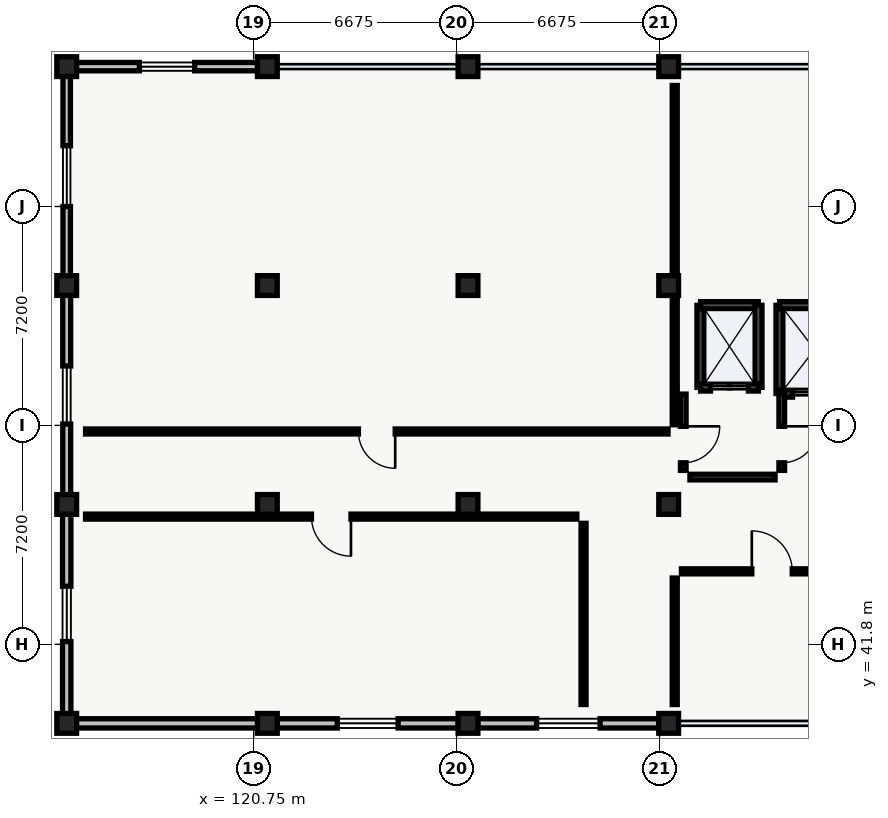
"""IFC4 building model, lengths in metres.
Left out: names, types, materials, properties, quantities, classifications, styles, units other than length and angle.
Written with IfcOpenShell. Run it as: python <this file> out.ifc"""

import sys

from ifc_helpers import new_model, si_unit, direction, frame, frame_2d, origin, origin_2d, place, context, subcontext, project, spatial, rectangle, extrude, element, fill, save


model = new_model("IFC4")
c1 = context("Model", 3, precision=1e-05, world=origin(), true_north=direction((0.0, 1.0)))
c2 = subcontext(c1, "Body", "Model", "MODEL_VIEW")
j1 = project(units=[si_unit("LENGTHUNIT", "METRE"), si_unit("PLANEANGLEUNIT", "RADIAN")], contexts=[c1])
p1 = place(None, origin())
s1 = spatial("IfcSite", under=j1, at=p1, CompositionType="ELEMENT")
p2 = place(p1, origin())
s2 = spatial("IfcBuilding", under=s1, at=p2, CompositionType="ELEMENT")
p3 = place(p2, frame((0.0, 0.0, 18.6)))
s3 = spatial("IfcBuildingStorey", under=s2, at=p3, CompositionType="ELEMENT", Elevation=18.6)
for number, where, z_axis, x_axis in (
    (1, (114.6, 39.2, 0.0), (0.0, 0.0, 1.0), (1.0, 0.0, 0.0)),
    (2, (114.6, 46.4, 0.0), (0.0, 0.0, 1.0), (1.0, 0.0, 0.0)),
    (3, (114.6, 53.6, 0.0), (0.0, 0.0, 1.0), (1.0, 0.0, 0.0)),
    (4, (114.6, 60.8, 0.0), (0.0, 0.0, 1.0), (1.0, 0.0, 0.0)),
    (5, (121.2, 39.2, 0.0), (0.0, 0.0, 1.0), (1.0, 0.0, 0.0)),
    (6, (121.2, 46.4, 0.0), (0.0, 0.0, 1.0), (1.0, 0.0, 0.0)),
    (7, (121.2, 53.6, 0.0), (0.0, 0.0, 1.0), (1.0, 0.0, 0.0)),
    (8, (121.2, 60.8, 0.0), (0.0, 0.0, 1.0), (1.0, 0.0, 0.0)),
    (9, (127.8, 39.2, 0.0), (0.0, 0.0, 1.0), (1.0, 0.0, 0.0)),
    (10, (127.8, 46.4, 0.0), (0.0, 0.0, 1.0), (1.0, 0.0, 0.0)),
    (11, (127.8, 53.6, 0.0), (0.0, 0.0, 1.0), (1.0, 0.0, 0.0)),
    (12, (127.8, 60.8, 0.0), (0.0, 0.0, 1.0), (1.0, 0.0, 0.0)),
    (13, (134.4, 39.2, 0.0), (0.0, 0.0, 1.0), (1.0, 0.0, 0.0)),
    (14, (134.4, 46.4, 0.0), (0.0, 0.0, 1.0), (1.0, 0.0, 0.0)),
    (15, (134.4, 53.6, 0.0), (0.0, 0.0, 1.0), (1.0, 0.0, 0.0)),
    (16, (134.4, 60.8, 0.0), (0.0, 0.0, 1.0), (1.0, 0.0, 0.0)),
):
    element("IfcColumn", number, at=place(p3, frame(where, z_axis=z_axis, x_axis=x_axis)), inside=s3, PredefinedType="COLUMN", context=c2, shape_type="SweptSolid", body=[
        extrude(rectangle(XDim=0.65, YDim=0.65, at=origin_2d()), origin(), (0.0, 0.0, 1.0), 4.3),
    ])
p4 = place(p3, frame((114.6, 39.52, 0.0), z_axis=(0.0, 0.0, 1.0), x_axis=(0.0, 1.0, 0.0)))
e17 = element("IfcWall", 17, at=p4, inside=s3, PredefinedType="STANDARD", context=c2, shape_type="SweptSolid", body=[
    extrude(rectangle(XDim=6.56, YDim=0.275, at=frame_2d((3.28, 0.0))), origin(), (0.0, 0.0, 1.0), 3.835),
])
p5 = place(p4, frame((2.37, 0.0, 0.95)))
e18 = element("IfcOpeningElement", 18, at=p5, cuts=e17, PredefinedType="OPENING", context=c2, shape_type="SweptSolid", body=[
    extrude(rectangle(XDim=1.82, YDim=1.38, at=frame_2d((0.91, 0.69))), frame((0.0, 0.137, 0.0), z_axis=(0.0, -1.0, 0.0), x_axis=(1.0, 0.0, 0.0)), (0.0, 0.0, 1.0), 0.275),
])
p6 = place(p3, frame((114.6, 46.72, 0.0), z_axis=(0.0, 0.0, 1.0), x_axis=(0.0, 1.0, 0.0)))
e19 = element("IfcWall", 19, at=p6, inside=s3, PredefinedType="STANDARD", context=c2, shape_type="SweptSolid", body=[
    extrude(rectangle(XDim=6.56, YDim=0.26, at=frame_2d((3.28, 0.0))), origin(), (0.0, 0.0, 1.0), 3.835),
])
p7 = place(p6, frame((2.325, 0.0, 0.95)))
e20 = element("IfcOpeningElement", 20, at=p7, cuts=e19, PredefinedType="OPENING", context=c2, shape_type="SweptSolid", body=[
    extrude(rectangle(XDim=1.91, YDim=1.4, at=frame_2d((0.955, 0.7))), frame((0.0, 0.13, 0.0), z_axis=(0.0, -1.0, 0.0), x_axis=(1.0, 0.0, 0.0)), (0.0, 0.0, 1.0), 0.26),
])
p8 = place(p3, frame((114.6, 53.92, 0.0), z_axis=(0.0, 0.0, 1.0), x_axis=(0.0, 1.0, 0.0)))
e21 = element("IfcWall", 21, at=p8, inside=s3, PredefinedType="STANDARD", context=c2, shape_type="SweptSolid", body=[
    extrude(rectangle(XDim=6.56, YDim=0.245, at=frame_2d((3.28, 0.0))), origin(), (0.0, 0.0, 1.0), 3.835),
])
p9 = place(p8, frame((2.28, 0.0, 0.95)))
e22 = element("IfcOpeningElement", 22, at=p9, cuts=e21, PredefinedType="OPENING", context=c2, shape_type="SweptSolid", body=[
    extrude(rectangle(XDim=2.0, YDim=1.42, at=frame_2d((1.0, 0.71))), frame((0.0, 0.123, 0.0), z_axis=(0.0, -1.0, 0.0), x_axis=(1.0, 0.0, 0.0)), (0.0, 0.0, 1.0), 0.245),
])
p10 = place(p3, frame((114.92, 60.8, 0.0), z_axis=(0.0, 0.0, 1.0), x_axis=(1.0, 0.0, 0.0)))
e23 = element("IfcWall", 23, at=p10, inside=s3, PredefinedType="STANDARD", context=c2, shape_type="SweptSolid", body=[
    extrude(rectangle(XDim=5.96, YDim=0.275, at=frame_2d((2.98, 0.0))), origin(), (0.0, 0.0, 1.0), 3.835),
])
p11 = place(p10, frame((2.07, 0.0, 0.95)))
e24 = element("IfcOpeningElement", 24, at=p11, cuts=e23, PredefinedType="OPENING", context=c2, shape_type="SweptSolid", body=[
    extrude(rectangle(XDim=1.82, YDim=1.38, at=frame_2d((0.91, 0.69))), frame((0.0, 0.137, 0.0), z_axis=(0.0, -1.0, 0.0), x_axis=(1.0, 0.0, 0.0)), (0.0, 0.0, 1.0), 0.275),
])
p12 = place(p3, frame((134.08, 39.2, 0.0), z_axis=(0.0, 0.0, 1.0), x_axis=(-1.0, 0.0, 0.0)))
e25 = element("IfcWall", 25, at=p12, inside=s3, PredefinedType="STANDARD", context=c2, shape_type="SweptSolid", body=[
    extrude(rectangle(XDim=5.96, YDim=0.305, at=frame_2d((2.98, 0.0))), origin(), (0.0, 0.0, 1.0), 3.835),
])
p13 = place(p12, frame((1.935, 0.0, 0.95)))
e26 = element("IfcOpeningElement", 26, at=p13, cuts=e25, PredefinedType="OPENING", context=c2, shape_type="SweptSolid", body=[
    extrude(rectangle(XDim=2.09, YDim=1.44, at=frame_2d((1.045, 0.72))), frame((0.0, 0.152, 0.0), z_axis=(0.0, -1.0, 0.0), x_axis=(1.0, 0.0, 0.0)), (0.0, 0.0, 1.0), 0.305),
])
p14 = place(p3, frame((127.48, 39.2, 0.0), z_axis=(0.0, 0.0, 1.0), x_axis=(-1.0, 0.0, 0.0)))
e27 = element("IfcWall", 27, at=p14, inside=s3, PredefinedType="STANDARD", context=c2, shape_type="SweptSolid", body=[
    extrude(rectangle(XDim=5.96, YDim=0.305, at=frame_2d((2.98, 0.0))), origin(), (0.0, 0.0, 1.0), 3.835),
])
p15 = place(p14, frame((1.98, 0.0, 0.95)))
e28 = element("IfcOpeningElement", 28, at=p15, cuts=e27, PredefinedType="OPENING", context=c2, shape_type="SweptSolid", body=[
    extrude(rectangle(XDim=2.0, YDim=1.42, at=frame_2d((1.0, 0.71))), frame((0.0, 0.152, 0.0), z_axis=(0.0, -1.0, 0.0), x_axis=(1.0, 0.0, 0.0)), (0.0, 0.0, 1.0), 0.305),
])
p16 = place(p3, frame((120.88, 39.2, 0.0), z_axis=(0.0, 0.0, 1.0), x_axis=(-1.0, 0.0, 0.0)))
e29 = element("IfcWall", 29, at=p16, inside=s3, PredefinedType="STANDARD", context=c2, shape_type="SweptSolid", body=[
    extrude(rectangle(XDim=5.96, YDim=0.305, at=frame_2d((2.98, 0.0))), origin(), (0.0, 0.0, 1.0), 3.835),
])
p17 = place(p3, frame((135.45, 50.25, 0.0), z_axis=(0.0, 0.0, 1.0), x_axis=(0.0, 1.0, 0.0)))
e30 = element("IfcWall", 30, at=p17, inside=s3, PredefinedType="SHEAR", context=c2, shape_type="SweptSolid", body=[
    extrude(rectangle(XDim=2.7, YDim=0.24, at=frame_2d((1.35, 0.0))), origin(), (0.0, 0.0, 1.0), 4.28),
])
p18 = place(p3, frame((135.45, 52.95, 0.0), z_axis=(0.0, 0.0, 1.0), x_axis=(1.0, 0.0, 0.0)))
e31 = element("IfcWall", 31, at=p18, inside=s3, PredefinedType="SHEAR", context=c2, shape_type="SweptSolid", body=[
    extrude(rectangle(XDim=1.9, YDim=0.24, at=frame_2d((0.95, 0.0))), origin(), (0.0, 0.0, 1.0), 4.28),
])
p19 = place(p3, frame((137.35, 52.95, 0.0), z_axis=(0.0, 0.0, 1.0), x_axis=(0.0, -1.0, 0.0)))
e32 = element("IfcWall", 32, at=p19, inside=s3, PredefinedType="SHEAR", context=c2, shape_type="SweptSolid", body=[
    extrude(rectangle(XDim=2.7, YDim=0.24, at=frame_2d((1.35, 0.0))), origin(), (0.0, 0.0, 1.0), 4.28),
])
p20 = place(p3, frame((137.35, 50.25, 0.0), z_axis=(0.0, 0.0, 1.0), x_axis=(-1.0, 0.0, 0.0)))
e33 = element("IfcWall", 33, at=p20, inside=s3, PredefinedType="SHEAR", context=c2, shape_type="SweptSolid", body=[
    extrude(rectangle(XDim=1.9, YDim=0.24, at=frame_2d((0.95, 0.0))), origin(), (0.0, 0.0, 1.0), 4.28),
])
p21 = place(p20, frame((0.325, 0.0, 0.0)))
e34 = element("IfcOpeningElement", 34, at=p21, cuts=e33, PredefinedType="OPENING", context=c2, shape_type="SweptSolid", body=[
    extrude(rectangle(XDim=1.25, YDim=2.2, at=frame_2d((0.625, 1.1))), frame((0.0, 0.12, 0.0), z_axis=(0.0, -1.0, 0.0), x_axis=(1.0, 0.0, 0.0)), (0.0, 0.0, 1.0), 0.24),
])
p22 = place(p3, frame((138.05, 50.05, 0.0), z_axis=(0.0, 0.0, 1.0), x_axis=(0.0, 1.0, 0.0)))
e35 = element("IfcWall", 35, at=p22, inside=s3, PredefinedType="SHEAR", context=c2, shape_type="SweptSolid", body=[
    extrude(rectangle(XDim=2.9, YDim=0.24, at=frame_2d((1.45, 0.0))), origin(), (0.0, 0.0, 1.0), 4.28),
])
p23 = place(p3, frame((138.05, 52.95, 0.0), z_axis=(0.0, 0.0, 1.0), x_axis=(1.0, 0.0, 0.0)))
e36 = element("IfcWall", 36, at=p23, inside=s3, PredefinedType="SHEAR", context=c2, shape_type="SweptSolid", body=[
    extrude(rectangle(XDim=2.3, YDim=0.24, at=frame_2d((1.15, 0.0))), origin(), (0.0, 0.0, 1.0), 4.28),
])
p24 = place(p3, frame((140.35, 50.05, 0.0), z_axis=(0.0, 0.0, 1.0), x_axis=(-1.0, 0.0, 0.0)))
e37 = element("IfcWall", 37, at=p24, inside=s3, PredefinedType="SHEAR", context=c2, shape_type="SweptSolid", body=[
    extrude(rectangle(XDim=2.3, YDim=0.24, at=frame_2d((1.15, 0.0))), origin(), (0.0, 0.0, 1.0), 4.28),
])
p25 = place(p24, frame((0.425, 0.0, 0.0)))
e38 = element("IfcOpeningElement", 38, at=p25, cuts=e37, PredefinedType="OPENING", context=c2, shape_type="SweptSolid", body=[
    extrude(rectangle(XDim=1.45, YDim=2.3, at=frame_2d((0.725, 1.15))), frame((0.0, 0.12, 0.0), z_axis=(0.0, -1.0, 0.0), x_axis=(1.0, 0.0, 0.0)), (0.0, 0.0, 1.0), 0.24),
])
p26 = place(p3, frame((135.1, 47.3, 0.0), z_axis=(0.0, 0.0, 1.0), x_axis=(1.0, 0.0, 0.0)))
e39 = element("IfcWall", 39, at=p26, inside=s3, PredefinedType="SOLIDWALL", context=c2, shape_type="SweptSolid", body=[
    extrude(rectangle(XDim=2.8, YDim=0.185, at=frame_2d((1.4, 0.0))), origin(), (0.0, 0.0, 1.0), 3.95),
])
p27 = place(p3, frame((138.12, 47.52, 0.0), z_axis=(0.0, 0.0, 1.0), x_axis=(0.0, 1.0, 0.0)))
e40 = element("IfcWall", 40, at=p27, inside=s3, PredefinedType="SOLIDWALL", context=c2, shape_type="SweptSolid", body=[
    extrude(rectangle(XDim=2.51, YDim=0.185, at=frame_2d((1.255, 0.0))), origin(), (0.0, 0.0, 1.0), 3.95),
])
p28 = place(p27, frame((0.25, 0.0, 0.0)))
e41 = element("IfcOpeningElement", 41, at=p28, cuts=e40, PredefinedType="OPENING", context=c2, shape_type="SweptSolid", body=[
    extrude(rectangle(XDim=1.2, YDim=2.15, at=frame_2d((0.6, 1.075))), frame((0.0, 0.093, 0.0), z_axis=(0.0, -1.0, 0.0), x_axis=(1.0, 0.0, 0.0)), (0.0, 0.0, 1.0), 0.185),
])
p29 = place(p3, frame((134.88, 50.03, 0.0), z_axis=(0.0, 0.0, 1.0), x_axis=(0.0, -1.0, 0.0)))
e42 = element("IfcWall", 42, at=p29, inside=s3, PredefinedType="SOLIDWALL", context=c2, shape_type="SweptSolid", body=[
    extrude(rectangle(XDim=2.51, YDim=0.185, at=frame_2d((1.255, 0.0))), origin(), (0.0, 0.0, 1.0), 3.95),
])
p30 = place(p29, frame((1.06, 0.0, 0.0)))
e43 = element("IfcOpeningElement", 43, at=p30, cuts=e42, PredefinedType="OPENING", context=c2, shape_type="SweptSolid", body=[
    extrude(rectangle(XDim=1.2, YDim=2.15, at=frame_2d((0.6, 1.075))), frame((0.0, 0.093, 0.0), z_axis=(0.0, -1.0, 0.0), x_axis=(1.0, 0.0, 0.0)), (0.0, 0.0, 1.0), 0.185),
])
p31 = place(p3, frame((115.22, 48.8, 0.0), z_axis=(0.0, 0.0, 1.0), x_axis=(1.0, 0.0, 0.0)))
e44 = element("IfcWall", 44, at=p31, inside=s3, PredefinedType="PARTITIONING", context=c2, shape_type="SweptSolid", body=[
    extrude(rectangle(XDim=19.16, YDim=0.165, at=frame_2d((9.58, 0.0))), origin(), (0.0, 0.0, 1.0), 3.885),
])
p32 = place(p31, frame((8.975, 0.0, 0.0)))
e45 = element("IfcOpeningElement", 45, at=p32, cuts=e44, PredefinedType="OPENING", context=c2, shape_type="SweptSolid", body=[
    extrude(rectangle(XDim=1.21, YDim=2.16, at=frame_2d((0.605, 1.08))), frame((0.0, 0.083, 0.0), z_axis=(0.0, -1.0, 0.0), x_axis=(1.0, 0.0, 0.0)), (0.0, 0.0, 1.0), 0.165),
])
p33 = place(p3, frame((134.6, 49.02, 0.0), z_axis=(0.0, 0.0, 1.0), x_axis=(0.0, 1.0, 0.0)))
e46 = element("IfcWall", 46, at=p33, inside=s3, PredefinedType="PARTITIONING", context=c2, shape_type="SweptSolid", body=[
    extrude(rectangle(XDim=11.16, YDim=0.165, at=frame_2d((5.58, 0.0))), origin(), (0.0, 0.0, 1.0), 3.685),
])
p34 = place(p3, frame((131.6, 39.82, 0.0), z_axis=(0.0, 0.0, 1.0), x_axis=(0.0, 1.0, 0.0)))
e47 = element("IfcWall", 47, at=p34, inside=s3, PredefinedType="PARTITIONING", context=c2, shape_type="SweptSolid", body=[
    extrude(rectangle(XDim=5.96, YDim=0.165, at=frame_2d((2.98, 0.0))), origin(), (0.0, 0.0, 1.0), 3.95),
])
p35 = place(p3, frame((131.38, 46.0, 0.0), z_axis=(0.0, 0.0, 1.0), x_axis=(-1.0, 0.0, 0.0)))
e48 = element("IfcWall", 48, at=p35, inside=s3, PredefinedType="PARTITIONING", context=c2, shape_type="SweptSolid", body=[
    extrude(rectangle(XDim=16.16, YDim=0.165, at=frame_2d((8.08, 0.0))), origin(), (0.0, 0.0, 1.0), 3.95),
])
p36 = place(p35, frame((7.43, 0.0, 0.0)))
e49 = element("IfcOpeningElement", 49, at=p36, cuts=e48, PredefinedType="OPENING", context=c2, shape_type="SweptSolid", body=[
    extrude(rectangle(XDim=1.3, YDim=2.1, at=frame_2d((0.65, 1.05))), frame((0.0, 0.083, 0.0), z_axis=(0.0, -1.0, 0.0), x_axis=(1.0, 0.0, 0.0)), (0.0, 0.0, 1.0), 0.165),
])
p37 = place(p3, frame((140.78, 44.2, 0.0), z_axis=(0.0, 0.0, 1.0), x_axis=(-1.0, 0.0, 0.0)))
e50 = element("IfcWall", 50, at=p37, inside=s3, PredefinedType="PARTITIONING", context=c2, shape_type="SweptSolid", body=[
    extrude(rectangle(XDim=5.96, YDim=0.165, at=frame_2d((2.98, 0.0))), origin(), (0.0, 0.0, 1.0), 3.95),
])
p38 = place(p37, frame((2.315, 0.0, 0.0)))
e51 = element("IfcOpeningElement", 51, at=p38, cuts=e50, PredefinedType="OPENING", context=c2, shape_type="SweptSolid", body=[
    extrude(rectangle(XDim=1.33, YDim=2.12, at=frame_2d((0.665, 1.06))), frame((0.0, 0.083, 0.0), z_axis=(0.0, -1.0, 0.0), x_axis=(1.0, 0.0, 0.0)), (0.0, 0.0, 1.0), 0.165),
])
p39 = place(p3, frame((134.6, 43.98, 0.0), z_axis=(0.0, 0.0, 1.0), x_axis=(0.0, -1.0, 0.0)))
e52 = element("IfcWall", 52, at=p39, inside=s3, PredefinedType="PARTITIONING", context=c2, shape_type="SweptSolid", body=[
    extrude(rectangle(XDim=4.16, YDim=0.165, at=frame_2d((2.08, 0.0))), origin(), (0.0, 0.0, 1.0), 3.685),
])
p40 = place(p5, origin())
e53 = element("IfcWindow", 53, at=p40, inside=s3, PartitioningType="SINGLE_PANEL", PredefinedType="WINDOW", context=c2, shape_type="SweptSolid", body=[
    extrude(rectangle(XDim=1.82, YDim=1.38, at=frame_2d((0.91, 0.69))), frame((0.0, 0.03, 0.0), z_axis=(0.0, -1.0, 0.0), x_axis=(1.0, 0.0, 0.0)), (0.0, 0.0, 1.0), 0.06),
])
fill(e18, e53)
p41 = place(p7, origin())
e54 = element("IfcWindow", 54, at=p41, inside=s3, PartitioningType="SINGLE_PANEL", PredefinedType="WINDOW", context=c2, shape_type="SweptSolid", body=[
    extrude(rectangle(XDim=1.91, YDim=1.4, at=frame_2d((0.955, 0.7))), frame((0.0, 0.03, 0.0), z_axis=(0.0, -1.0, 0.0), x_axis=(1.0, 0.0, 0.0)), (0.0, 0.0, 1.0), 0.06),
])
fill(e20, e54)
p42 = place(p9, origin())
e55 = element("IfcWindow", 55, at=p42, inside=s3, PartitioningType="SINGLE_PANEL", PredefinedType="WINDOW", context=c2, shape_type="SweptSolid", body=[
    extrude(rectangle(XDim=2.0, YDim=1.42, at=frame_2d((1.0, 0.71))), frame((0.0, 0.03, 0.0), z_axis=(0.0, -1.0, 0.0), x_axis=(1.0, 0.0, 0.0)), (0.0, 0.0, 1.0), 0.06),
])
fill(e22, e55)
p43 = place(p11, origin())
e56 = element("IfcWindow", 56, at=p43, inside=s3, PartitioningType="SINGLE_PANEL", PredefinedType="WINDOW", context=c2, shape_type="SweptSolid", body=[
    extrude(rectangle(XDim=1.82, YDim=1.38, at=frame_2d((0.91, 0.69))), frame((0.0, 0.03, 0.0), z_axis=(0.0, -1.0, 0.0), x_axis=(1.0, 0.0, 0.0)), (0.0, 0.0, 1.0), 0.06),
])
fill(e24, e56)
p44 = place(p13, origin())
e57 = element("IfcWindow", 57, at=p44, inside=s3, PartitioningType="SINGLE_PANEL", PredefinedType="WINDOW", context=c2, shape_type="SweptSolid", body=[
    extrude(rectangle(XDim=2.09, YDim=1.44, at=frame_2d((1.045, 0.72))), frame((0.0, 0.03, 0.0), z_axis=(0.0, -1.0, 0.0), x_axis=(1.0, 0.0, 0.0)), (0.0, 0.0, 1.0), 0.06),
])
fill(e26, e57)
p45 = place(p15, origin())
e58 = element("IfcWindow", 58, at=p45, inside=s3, PartitioningType="SINGLE_PANEL", PredefinedType="WINDOW", context=c2, shape_type="SweptSolid", body=[
    extrude(rectangle(XDim=2.0, YDim=1.42, at=frame_2d((1.0, 0.71))), frame((0.0, 0.03, 0.0), z_axis=(0.0, -1.0, 0.0), x_axis=(1.0, 0.0, 0.0)), (0.0, 0.0, 1.0), 0.06),
])
fill(e28, e58)
p46 = place(p21, origin())
e59 = element("IfcDoor", 59, at=p46, inside=s3, OperationType="SLIDING_TO_RIGHT", PredefinedType="DOOR", context=c2, shape_type="SweptSolid", body=[
    extrude(rectangle(XDim=1.25, YDim=2.2, at=frame_2d((0.625, 1.1))), frame((0.0, 0.025, 0.0), z_axis=(0.0, -1.0, 0.0), x_axis=(1.0, 0.0, 0.0)), (0.0, 0.0, 1.0), 0.05),
])
fill(e34, e59)
p47 = place(p25, origin())
e60 = element("IfcDoor", 60, at=p47, inside=s3, OperationType="DOUBLE_DOOR_SLIDING", PredefinedType="DOOR", context=c2, shape_type="SweptSolid", body=[
    extrude(rectangle(XDim=1.45, YDim=2.3, at=frame_2d((0.725, 1.15))), frame((0.0, 0.025, 0.0), z_axis=(0.0, -1.0, 0.0), x_axis=(1.0, 0.0, 0.0)), (0.0, 0.0, 1.0), 0.05),
])
fill(e38, e60)
p48 = place(p28, origin())
e61 = element("IfcDoor", 61, at=p48, inside=s3, OperationType="SINGLE_SWING_RIGHT", PredefinedType="DOOR", context=c2, shape_type="SweptSolid", body=[
    extrude(rectangle(XDim=1.2, YDim=2.15, at=frame_2d((0.6, 1.075))), frame((0.0, 0.025, 0.0), z_axis=(0.0, -1.0, 0.0), x_axis=(1.0, 0.0, 0.0)), (0.0, 0.0, 1.0), 0.05),
])
fill(e41, e61)
p49 = place(p30, origin())
e62 = element("IfcDoor", 62, at=p49, inside=s3, OperationType="SINGLE_SWING_LEFT", PredefinedType="DOOR", context=c2, shape_type="SweptSolid", body=[
    extrude(rectangle(XDim=1.2, YDim=2.15, at=frame_2d((0.6, 1.075))), frame((0.0, 0.025, 0.0), z_axis=(0.0, -1.0, 0.0), x_axis=(1.0, 0.0, 0.0)), (0.0, 0.0, 1.0), 0.05),
])
fill(e43, e62)
p50 = place(p32, origin())
e63 = element("IfcDoor", 63, at=p50, inside=s3, OperationType="SINGLE_SWING_RIGHT", PredefinedType="DOOR", context=c2, shape_type="SweptSolid", body=[
    extrude(rectangle(XDim=1.21, YDim=2.16, at=frame_2d((0.605, 1.08))), frame((0.0, 0.025, 0.0), z_axis=(0.0, -1.0, 0.0), x_axis=(1.0, 0.0, 0.0)), (0.0, 0.0, 1.0), 0.05),
])
fill(e45, e63)
p51 = place(p36, origin())
e64 = element("IfcDoor", 64, at=p51, inside=s3, OperationType="SINGLE_SWING_LEFT", PredefinedType="DOOR", context=c2, shape_type="SweptSolid", body=[
    extrude(rectangle(XDim=1.3, YDim=2.1, at=frame_2d((0.65, 1.05))), frame((0.0, 0.025, 0.0), z_axis=(0.0, -1.0, 0.0), x_axis=(1.0, 0.0, 0.0)), (0.0, 0.0, 1.0), 0.05),
])
fill(e49, e64)
p52 = place(p38, origin())
e65 = element("IfcDoor", 65, at=p52, inside=s3, OperationType="SINGLE_SWING_RIGHT", PredefinedType="DOOR", context=c2, shape_type="SweptSolid", body=[
    extrude(rectangle(XDim=1.33, YDim=2.12, at=frame_2d((0.665, 1.06))), frame((0.0, 0.025, 0.0), z_axis=(0.0, -1.0, 0.0), x_axis=(1.0, 0.0, 0.0)), (0.0, 0.0, 1.0), 0.05),
])
fill(e51, e65)
save(model, sys.argv[1])
